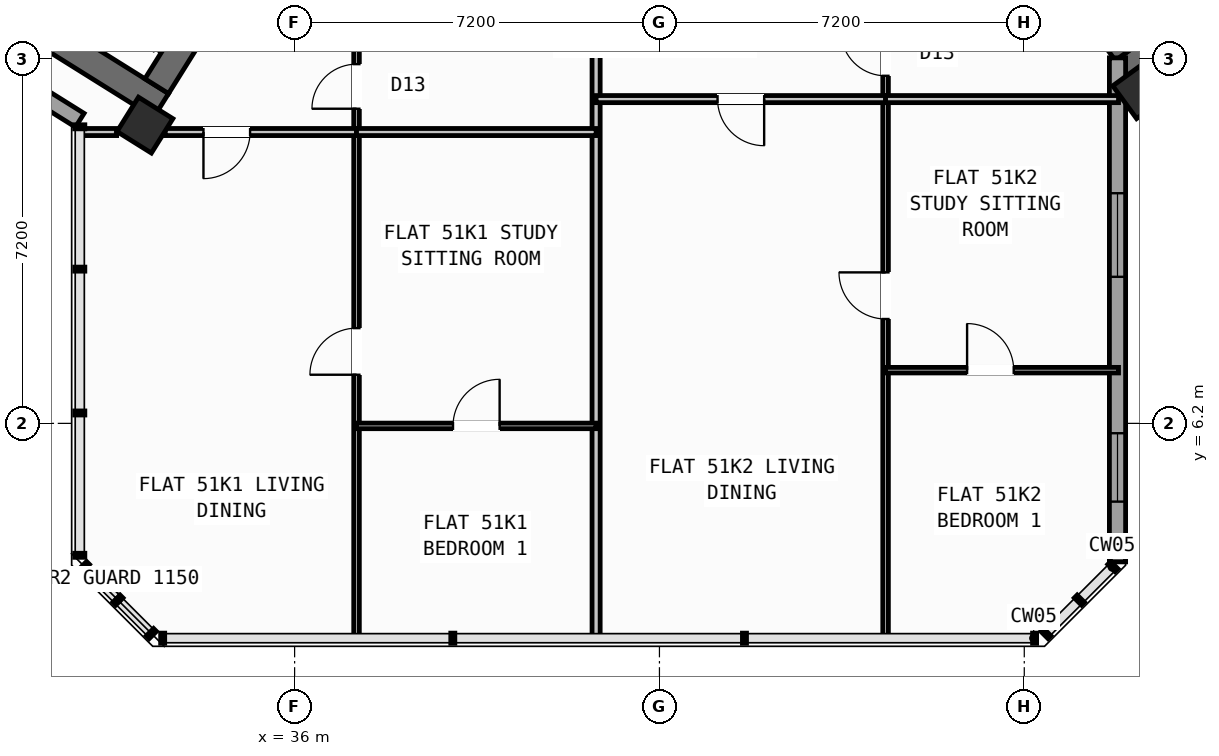
"""IFC4 building model, lengths in metres.
Left out: names, types, materials, properties, quantities, classifications, styles, units other than length and angle.
Written with IfcOpenShell. Run it as: python <this file> out.ifc"""

import sys

from ifc_helpers import new_model, si_unit, direction, frame, frame_2d, origin, origin_2d, place, context, subcontext, project, spatial, rectangle, hollow_rectangle, extrude, source, transform, mapped, element, fill, save


model = new_model("IFC4")
c1 = context("Model", 3, precision=1e-05, world=origin(), true_north=direction((0.0, 1.0)))
c2 = subcontext(c1, "Body", "Model", "MODEL_VIEW")
j1 = project(units=[si_unit("LENGTHUNIT", "METRE"), si_unit("PLANEANGLEUNIT", "RADIAN")], contexts=[c1])
p1 = place(None, origin())
s1 = spatial("IfcSite", under=j1, at=p1, CompositionType="ELEMENT")
p2 = place(p1, origin())
s2 = spatial("IfcBuilding", under=s1, at=p2, CompositionType="ELEMENT")
p3 = place(p2, frame((0.0, 0.0, 204.0)))
s3 = spatial("IfcBuildingStorey", under=s2, at=p3, CompositionType="ELEMENT", Elevation=204.0)
p4 = place(p3, frame((33.366, 12.477, 0.0), z_axis=(0.0, 0.0, 1.0), x_axis=(-0.848047359947, 0.529920442413, 0.0)))
e1 = element("IfcWall", 1, at=p4, inside=s3, PredefinedType="SHEAR", context=c2, shape_type="SweptSolid", body=[
    extrude(rectangle(XDim=13.14, YDim=0.55, at=frame_2d((6.57, 0.0))), origin(), (0.0, 0.0, 1.0), 3.35),
])
p5 = place(p3, frame((36.683, 18.304, 0.0), z_axis=(0.0, 0.0, 1.0), x_axis=(-0.529896466841, -0.848062341122, 0.0)))
e2 = element("IfcWall", 2, at=p5, inside=s3, PredefinedType="SHEAR", context=c2, shape_type="SweptSolid", body=[
    extrude(rectangle(XDim=6.425, YDim=0.55, at=frame_2d((3.212, 0.0))), origin(), (0.0, 0.0, 1.0), 3.35),
])
p6 = place(p3, frame((52.359, 13.14, 0.0), z_axis=(0.0, 0.0, 1.0), x_axis=(0.809014896919, 0.587788139183, 0.0)))
e3 = element("IfcWall", 3, at=p6, inside=s3, PredefinedType="SHEAR", context=c2, shape_type="SweptSolid", body=[
    extrude(rectangle(XDim=12.34, YDim=0.55, at=frame_2d((6.17, 0.0))), origin(), (0.0, 0.0, 1.0), 3.35),
])
p7 = place(p3, frame((52.42, 13.524, 0.0), z_axis=(0.0, 0.0, 1.0), x_axis=(-0.587802113096, 0.809004744015, 0.0)))
e4 = element("IfcWall", 4, at=p7, inside=s3, PredefinedType="SHEAR", context=c2, shape_type="SweptSolid", body=[
    extrude(rectangle(XDim=3.575, YDim=0.55, at=frame_2d((1.788, 0.0))), origin(), (0.0, 0.0, 1.0), 3.35),
])
m1 = source(origin(), c2, "Body", "SweptSolid", [
    extrude(hollow_rectangle(XDim=0.8, YDim=0.8, WallThickness=0.032, at=origin_2d()), origin(), (0.0, 0.0, 1.0), 3.6),
])
for number, where, z_axis, x_axis in (
    (5, (33.046, 12.087, 0.0), (0.0, 0.0, 1.0), (-0.848, 0.53, 0.0)),
    (6, (52.705, 12.773, 0.0), (0.0, 0.0, 1.0), (0.809, 0.588, 0.0)),
):
    element("IfcColumn", number, at=place(p3, frame(where, z_axis=z_axis, x_axis=x_axis)), inside=s3, PredefinedType="COLUMN", context=c2, shape_type="MappedRepresentation", body=[
        mapped(m1, transform((0.0, 0.0, 0.0), scale=1.0)),
    ])
p8 = place(p3, frame((31.76, 12.183, 0.0), z_axis=(0.0, 0.0, 1.0), x_axis=(-0.848047074256, 0.529920899612, 0.0)))
e7 = element("IfcWall", 7, at=p8, inside=s3, PredefinedType="STANDARD", context=c2, shape_type="SweptSolid", body=[
    extrude(rectangle(XDim=30.652, YDim=0.32, at=frame_2d((15.326, 0.0))), origin(), (0.0, 0.0, 1.0), 3.35),
])
p9 = place(p8, frame((15.166, 0.0, 0.0)))
e8 = element("IfcOpeningElement", 8, at=p9, cuts=e7, PredefinedType="OPENING", context=c2, shape_type="SweptSolid", body=[
    extrude(rectangle(XDim=1.2, YDim=2.15, at=frame_2d((0.6, 1.075))), frame((0.0, 0.17, 0.0), z_axis=(0.0, -1.0, 0.0), x_axis=(1.0, 0.0, 0.0)), (0.0, 0.0, 1.0), 0.34),
])
p10 = place(p8, frame((2.24, 0.0, 0.9)))
e9 = element("IfcOpeningElement", 9, at=p10, cuts=e7, PredefinedType="OPENING", context=c2, shape_type="SweptSolid", body=[
    extrude(rectangle(XDim=1.65, YDim=1.45, at=frame_2d((0.825, 0.725))), frame((0.0, 0.17, 0.0), z_axis=(0.0, -1.0, 0.0), x_axis=(1.0, 0.0, 0.0)), (0.0, 0.0, 1.0), 0.34),
])
p11 = place(p8, frame((7.469, 0.0, 0.9)))
e10 = element("IfcOpeningElement", 10, at=p11, cuts=e7, PredefinedType="OPENING", context=c2, shape_type="SweptSolid", body=[
    extrude(rectangle(XDim=1.65, YDim=1.45, at=frame_2d((0.825, 0.725))), frame((0.0, 0.17, 0.0), z_axis=(0.0, -1.0, 0.0), x_axis=(1.0, 0.0, 0.0)), (0.0, 0.0, 1.0), 0.34),
])
p12 = place(p8, frame((12.623, 0.0, 1.0)))
e11 = element("IfcOpeningElement", 11, at=p12, cuts=e7, PredefinedType="OPENING", context=c2, shape_type="SweptSolid", body=[
    extrude(rectangle(XDim=0.9, YDim=1.25, at=frame_2d((0.45, 0.625))), frame((0.0, 0.17, 0.0), z_axis=(0.0, -1.0, 0.0), x_axis=(1.0, 0.0, 0.0)), (0.0, 0.0, 1.0), 0.34),
])
p13 = place(p8, frame((19.556, 0.0, 1.0)))
e12 = element("IfcOpeningElement", 12, at=p13, cuts=e7, PredefinedType="OPENING", context=c2, shape_type="SweptSolid", body=[
    extrude(rectangle(XDim=0.9, YDim=1.25, at=frame_2d((0.45, 0.625))), frame((0.0, 0.17, 0.0), z_axis=(0.0, -1.0, 0.0), x_axis=(1.0, 0.0, 0.0)), (0.0, 0.0, 1.0), 0.34),
])
p14 = place(p8, frame((21.95, 0.0, 1.0)))
e13 = element("IfcOpeningElement", 13, at=p14, cuts=e7, PredefinedType="OPENING", context=c2, shape_type="SweptSolid", body=[
    extrude(rectangle(XDim=0.9, YDim=1.25, at=frame_2d((0.45, 0.625))), frame((0.0, 0.17, 0.0), z_axis=(0.0, -1.0, 0.0), x_axis=(1.0, 0.0, 0.0)), (0.0, 0.0, 1.0), 0.34),
])
p15 = place(p8, frame((26.983, 0.0, 0.9)))
e14 = element("IfcOpeningElement", 14, at=p15, cuts=e7, PredefinedType="OPENING", context=c2, shape_type="SweptSolid", body=[
    extrude(rectangle(XDim=1.35, YDim=1.45, at=frame_2d((0.675, 0.725))), frame((0.0, 0.17, 0.0), z_axis=(0.0, -1.0, 0.0), x_axis=(1.0, 0.0, 0.0)), (0.0, 0.0, 1.0), 0.34),
])
p16 = place(p3, frame((52.24, 13.414, 0.0), z_axis=(0.0, 0.0, 1.0), x_axis=(0.0, -1.0, 0.0)))
e15 = element("IfcWall", 15, at=p16, inside=s3, PredefinedType="STANDARD", context=c2, shape_type="SweptSolid", body=[
    extrude(rectangle(XDim=9.948, YDim=0.32, at=frame_2d((4.974, 0.0))), origin(), (0.0, 0.0, 1.0), 3.35),
])
p17 = place(p16, frame((2.671, 0.0, 0.9)))
e16 = element("IfcOpeningElement", 16, at=p17, cuts=e15, PredefinedType="OPENING", context=c2, shape_type="SweptSolid", body=[
    extrude(rectangle(XDim=1.65, YDim=1.45, at=frame_2d((0.825, 0.725))), frame((0.0, 0.17, 0.0), z_axis=(0.0, -1.0, 0.0), x_axis=(1.0, 0.0, 0.0)), (0.0, 0.0, 1.0), 0.34),
])
p18 = place(p16, frame((7.408, 0.0, 0.9)))
e17 = element("IfcOpeningElement", 17, at=p18, cuts=e15, PredefinedType="OPENING", context=c2, shape_type="SweptSolid", body=[
    extrude(rectangle(XDim=1.35, YDim=1.45, at=frame_2d((0.675, 0.725))), frame((0.0, 0.17, 0.0), z_axis=(0.0, -1.0, 0.0), x_axis=(1.0, 0.0, 0.0)), (0.0, 0.0, 1.0), 0.34),
])
p19 = place(p3, frame((41.95, 1.96, 0.0), z_axis=(0.0, 0.0, 1.0), x_axis=(0.0, 1.0, 0.0)))
e18 = element("IfcWall", 18, at=p19, inside=s3, PredefinedType="PARTITIONING", context=c2, shape_type="SweptSolid", body=[
    extrude(rectangle(XDim=13.46, YDim=0.16, at=frame_2d((6.73, 0.0))), origin(), (0.0, 0.0, 1.0), 3.34),
])
p20 = place(p3, frame((37.222, 1.96, 0.0), z_axis=(0.0, 0.0, 1.0), x_axis=(0.0, 1.0, 0.0)))
e19 = element("IfcWall", 19, at=p20, inside=s3, PredefinedType="PARTITIONING", context=c2, shape_type="SweptSolid", body=[
    extrude(rectangle(XDim=13.46, YDim=0.11, at=frame_2d((6.73, 0.0))), origin(), (0.0, 0.0, 1.0), 3.34),
])
p21 = place(p20, frame((5.2, 0.0, 0.0)))
e20 = element("IfcOpeningElement", 20, at=p21, cuts=e19, PredefinedType="OPENING", context=c2, shape_type="SweptSolid", body=[
    extrude(rectangle(XDim=0.92, YDim=2.08, at=frame_2d((0.46, 1.04))), frame((0.0, 0.065, 0.0), z_axis=(0.0, -1.0, 0.0), x_axis=(1.0, 0.0, 0.0)), (0.0, 0.0, 1.0), 0.13),
])
p22 = place(p20, frame((10.45, 0.0, 0.0)))
e21 = element("IfcOpeningElement", 21, at=p22, cuts=e19, PredefinedType="OPENING", context=c2, shape_type="SweptSolid", body=[
    extrude(rectangle(XDim=0.88, YDim=2.08, at=frame_2d((0.44, 1.04))), frame((0.0, 0.065, 0.0), z_axis=(0.0, -1.0, 0.0), x_axis=(1.0, 0.0, 0.0)), (0.0, 0.0, 1.0), 0.13),
])
p23 = place(p3, frame((31.74, 11.95, 0.0), z_axis=(0.0, 0.0, 1.0), x_axis=(1.0, 0.0, 0.0)))
e22 = element("IfcWall", 22, at=p23, inside=s3, PredefinedType="PLUMBINGWALL", context=c2, shape_type="SweptSolid", body=[
    extrude(rectangle(XDim=0.748, YDim=0.14, at=frame_2d((0.374, 0.0))), origin(), (0.0, 0.0, 1.0), 3.34),
])
p24 = place(p3, frame((33.447, 11.95, 0.0), z_axis=(0.0, 0.0, 1.0), x_axis=(1.0, 0.0, 0.0)))
e23 = element("IfcWall", 23, at=p24, inside=s3, PredefinedType="PLUMBINGWALL", context=c2, shape_type="SweptSolid", body=[
    extrude(rectangle(XDim=3.775, YDim=0.14, at=frame_2d((1.888, 0.0))), origin(), (0.0, 0.0, 1.0), 2.525),
])
p25 = place(p24, frame((0.755, 0.0, 0.0)))
e24 = element("IfcOpeningElement", 24, at=p25, cuts=e23, PredefinedType="OPENING", context=c2, shape_type="SweptSolid", body=[
    extrude(rectangle(XDim=0.92, YDim=2.08, at=frame_2d((0.46, 1.04))), frame((0.0, 0.08, 0.0), z_axis=(0.0, -1.0, 0.0), x_axis=(1.0, 0.0, 0.0)), (0.0, 0.0, 1.0), 0.16),
])
p26 = place(p3, frame((37.222, 11.95, 0.0), z_axis=(0.0, 0.0, 1.0), x_axis=(1.0, 0.0, 0.0)))
e25 = element("IfcWall", 25, at=p26, inside=s3, PredefinedType="PLUMBINGWALL", context=c2, shape_type="SweptSolid", body=[
    extrude(rectangle(XDim=4.728, YDim=0.14, at=frame_2d((2.364, 0.0))), origin(), (0.0, 0.0, 1.0), 2.525),
])
p27 = place(p3, frame((37.222, 6.15, 0.0), z_axis=(0.0, 0.0, 1.0), x_axis=(1.0, 0.0, 0.0)))
e26 = element("IfcWall", 26, at=p27, inside=s3, PredefinedType="PARTITIONING", context=c2, shape_type="SweptSolid", body=[
    extrude(rectangle(XDim=4.728, YDim=0.11, at=frame_2d((2.364, 0.0))), origin(), (0.0, 0.0, 1.0), 3.34),
])
p28 = place(p27, frame((1.904, 0.0, 0.0)))
e27 = element("IfcOpeningElement", 27, at=p28, cuts=e26, PredefinedType="OPENING", context=c2, shape_type="SweptSolid", body=[
    extrude(rectangle(XDim=0.92, YDim=2.08, at=frame_2d((0.46, 1.04))), frame((0.0, 0.065, 0.0), z_axis=(0.0, -1.0, 0.0), x_axis=(1.0, 0.0, 0.0)), (0.0, 0.0, 1.0), 0.13),
])
p29 = place(p3, frame((47.663, 1.96, 0.0), z_axis=(0.0, 0.0, 1.0), x_axis=(0.0, 1.0, 0.0)))
e28 = element("IfcWall", 28, at=p29, inside=s3, PredefinedType="PARTITIONING", context=c2, shape_type="SweptSolid", body=[
    extrude(rectangle(XDim=13.46, YDim=0.11, at=frame_2d((6.73, 0.0))), origin(), (0.0, 0.0, 1.0), 3.34),
])
p30 = place(p29, frame((6.3, 0.0, 0.0)))
e29 = element("IfcOpeningElement", 29, at=p30, cuts=e28, PredefinedType="OPENING", context=c2, shape_type="SweptSolid", body=[
    extrude(rectangle(XDim=0.92, YDim=2.08, at=frame_2d((0.46, 1.04))), frame((0.0, 0.065, 0.0), z_axis=(0.0, -1.0, 0.0), x_axis=(1.0, 0.0, 0.0)), (0.0, 0.0, 1.0), 0.13),
])
p31 = place(p29, frame((11.1, 0.0, 0.0)))
e30 = element("IfcOpeningElement", 30, at=p31, cuts=e28, PredefinedType="OPENING", context=c2, shape_type="SweptSolid", body=[
    extrude(rectangle(XDim=0.88, YDim=2.08, at=frame_2d((0.44, 1.04))), frame((0.0, 0.065, 0.0), z_axis=(0.0, -1.0, 0.0), x_axis=(1.0, 0.0, 0.0)), (0.0, 0.0, 1.0), 0.13),
])
p32 = place(p3, frame((41.95, 12.6, 0.0), z_axis=(0.0, 0.0, 1.0), x_axis=(1.0, 0.0, 0.0)))
e31 = element("IfcWall", 31, at=p32, inside=s3, PredefinedType="PLUMBINGWALL", context=c2, shape_type="SweptSolid", body=[
    extrude(rectangle(XDim=5.713, YDim=0.14, at=frame_2d((2.856, 0.0))), origin(), (0.0, 0.0, 1.0), 2.525),
])
p33 = place(p32, frame((2.396, 0.0, 0.0)))
e32 = element("IfcOpeningElement", 32, at=p33, cuts=e31, PredefinedType="OPENING", context=c2, shape_type="SweptSolid", body=[
    extrude(rectangle(XDim=0.92, YDim=2.08, at=frame_2d((0.46, 1.04))), frame((0.0, 0.08, 0.0), z_axis=(0.0, -1.0, 0.0), x_axis=(1.0, 0.0, 0.0)), (0.0, 0.0, 1.0), 0.16),
])
p34 = place(p3, frame((47.663, 12.6, 0.0), z_axis=(0.0, 0.0, 1.0), x_axis=(1.0, 0.0, 0.0)))
e33 = element("IfcWall", 33, at=p34, inside=s3, PredefinedType="PLUMBINGWALL", context=c2, shape_type="SweptSolid", body=[
    extrude(rectangle(XDim=4.597, YDim=0.14, at=frame_2d((2.298, 0.0))), origin(), (0.0, 0.0, 1.0), 2.525),
])
p35 = place(p3, frame((47.663, 7.25, 0.0), z_axis=(0.0, 0.0, 1.0), x_axis=(1.0, 0.0, 0.0)))
e34 = element("IfcWall", 34, at=p35, inside=s3, PredefinedType="PARTITIONING", context=c2, shape_type="SweptSolid", body=[
    extrude(rectangle(XDim=4.597, YDim=0.11, at=frame_2d((2.298, 0.0))), origin(), (0.0, 0.0, 1.0), 3.34),
])
p36 = place(p35, frame((1.608, 0.0, 0.0)))
e35 = element("IfcOpeningElement", 35, at=p36, cuts=e34, PredefinedType="OPENING", context=c2, shape_type="SweptSolid", body=[
    extrude(rectangle(XDim=0.92, YDim=2.08, at=frame_2d((0.46, 1.04))), frame((0.0, 0.065, 0.0), z_axis=(0.0, -1.0, 0.0), x_axis=(1.0, 0.0, 0.0)), (0.0, 0.0, 1.0), 0.13),
])
m2 = source(origin(), c2, "Body", "SweptSolid", [
    extrude(rectangle(XDim=1.65, YDim=1.45, at=frame_2d((0.825, 0.725))), frame((0.0, 0.03, 0.0), z_axis=(0.0, -1.0, 0.0), x_axis=(1.0, 0.0, 0.0)), (0.0, 0.0, 1.0), 0.06),
])
p37 = place(p17, origin())
e36 = element("IfcWindow", 36, at=p37, inside=s3, PartitioningType="SINGLE_PANEL", PredefinedType="WINDOW", context=c2, shape_type="MappedRepresentation", body=[
    mapped(m2, transform((0.0, 0.0, 0.0), scale=1.0)),
])
fill(e16, e36)
m3 = source(origin(), c2, "Body", "SweptSolid", [
    extrude(rectangle(XDim=1.35, YDim=1.45, at=frame_2d((0.675, 0.725))), frame((0.0, 0.03, 0.0), z_axis=(0.0, -1.0, 0.0), x_axis=(1.0, 0.0, 0.0)), (0.0, 0.0, 1.0), 0.06),
])
p38 = place(p18, origin())
e37 = element("IfcWindow", 37, at=p38, inside=s3, PartitioningType="SINGLE_PANEL", PredefinedType="WINDOW", context=c2, shape_type="MappedRepresentation", body=[
    mapped(m3, transform((0.0, 0.0, 0.0), scale=1.0)),
])
fill(e17, e37)
m4 = source(origin(), c2, "Body", "SweptSolid", [
    extrude(rectangle(XDim=0.92, YDim=2.08, at=frame_2d((0.46, 1.04))), frame((0.0, 0.025, 0.0), z_axis=(0.0, -1.0, 0.0), x_axis=(1.0, 0.0, 0.0)), (0.0, 0.0, 1.0), 0.05),
])
p39 = place(p21, origin())
e38 = element("IfcDoor", 38, at=p39, inside=s3, OperationType="SINGLE_SWING_LEFT", PredefinedType="DOOR", context=c2, shape_type="MappedRepresentation", body=[
    mapped(m4, transform((0.0, 0.0, 0.0), scale=1.0)),
])
fill(e20, e38)
p40 = place(p28, origin())
e39 = element("IfcDoor", 39, at=p40, inside=s3, OperationType="SINGLE_SWING_RIGHT", PredefinedType="DOOR", context=c2, shape_type="MappedRepresentation", body=[
    mapped(m4, transform((0.0, 0.0, 0.0), scale=1.0)),
])
fill(e27, e39)
p41 = place(p25, frame((0.92, 0.0, 0.0), z_axis=(0.0, 0.0, 1.0), x_axis=(-1.0, 0.0, 0.0)))
e40 = element("IfcDoor", 40, at=p41, inside=s3, OperationType="SINGLE_SWING_RIGHT", PredefinedType="DOOR", context=c2, shape_type="MappedRepresentation", body=[
    mapped(m4, transform((0.0, 0.0, 0.0), scale=1.0)),
])
fill(e24, e40)
m5 = source(origin(), c2, "Body", "SweptSolid", [
    extrude(rectangle(XDim=0.88, YDim=2.08, at=frame_2d((0.44, 1.04))), frame((0.0, 0.025, 0.0), z_axis=(0.0, -1.0, 0.0), x_axis=(1.0, 0.0, 0.0)), (0.0, 0.0, 1.0), 0.05),
])
p42 = place(p22, origin())
e41 = element("IfcDoor", 41, at=p42, inside=s3, OperationType="SINGLE_SWING_LEFT", PredefinedType="DOOR", context=c2, shape_type="MappedRepresentation", body=[
    mapped(m5, transform((0.0, 0.0, 0.0), scale=1.0)),
])
fill(e21, e41)
p43 = place(p30, origin())
e42 = element("IfcDoor", 42, at=p43, inside=s3, OperationType="SINGLE_SWING_RIGHT", PredefinedType="DOOR", context=c2, shape_type="MappedRepresentation", body=[
    mapped(m4, transform((0.0, 0.0, 0.0), scale=1.0)),
])
fill(e29, e42)
p44 = place(p36, origin())
e43 = element("IfcDoor", 43, at=p44, inside=s3, OperationType="SINGLE_SWING_LEFT", PredefinedType="DOOR", context=c2, shape_type="MappedRepresentation", body=[
    mapped(m4, transform((0.0, 0.0, 0.0), scale=1.0)),
])
fill(e35, e43)
p45 = place(p33, frame((0.92, 0.0, 0.0), z_axis=(0.0, 0.0, 1.0), x_axis=(-1.0, 0.0, 0.0)))
e44 = element("IfcDoor", 44, at=p45, inside=s3, OperationType="SINGLE_SWING_LEFT", PredefinedType="DOOR", context=c2, shape_type="MappedRepresentation", body=[
    mapped(m4, transform((0.0, 0.0, 0.0), scale=1.0)),
])
fill(e32, e44)
p46 = place(p31, origin())
e45 = element("IfcDoor", 45, at=p46, inside=s3, OperationType="SINGLE_SWING_RIGHT", PredefinedType="DOOR", context=c2, shape_type="MappedRepresentation", body=[
    mapped(m5, transform((0.0, 0.0, 0.0), scale=1.0)),
])
fill(e30, e45)
save(model, sys.argv[1])
